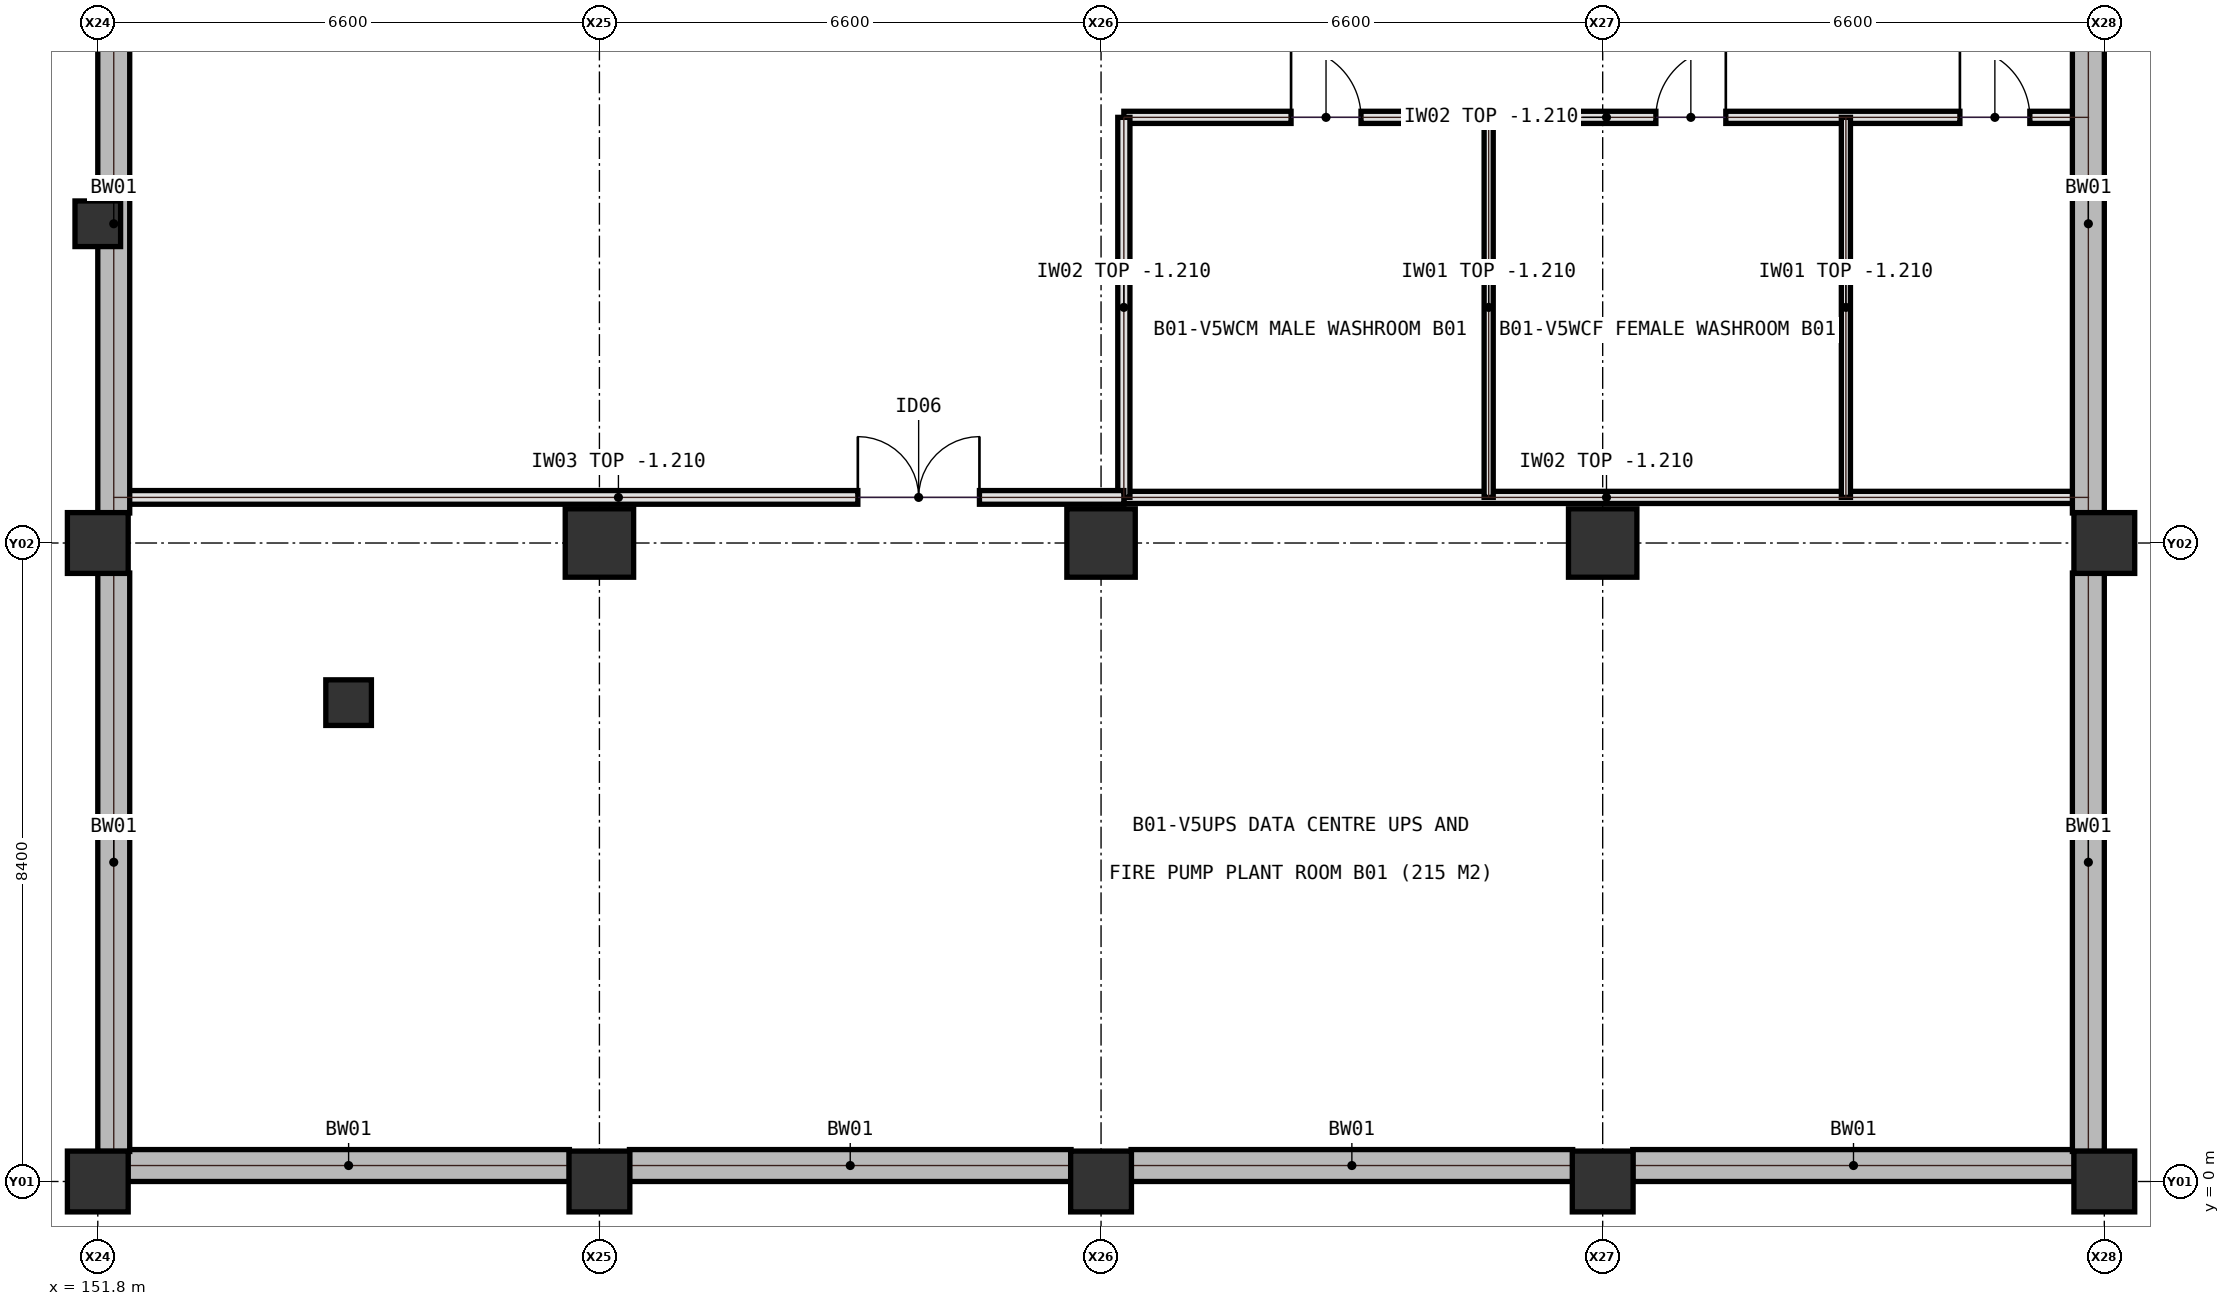
"""IFC4 building model, lengths in metres.
Left out: names, types, materials, properties, quantities, classifications, styles, units other than length and angle.
Written with IfcOpenShell. Run it as: python <this file> out.ifc"""

import sys

from ifc_helpers import new_model, si_unit, direction, frame, frame_2d, origin, origin_2d, place, context, subcontext, project, spatial, rectangle, extrude, element, fill, save


model = new_model("IFC4")
c1 = context("Model", 3, precision=1e-05, world=origin(), true_north=direction((0.0, 1.0)))
c2 = subcontext(c1, "Body", "Model", "MODEL_VIEW")
j1 = project(units=[si_unit("LENGTHUNIT", "METRE"), si_unit("PLANEANGLEUNIT", "RADIAN")], contexts=[c1])
p1 = place(None, origin())
s1 = spatial("IfcSite", under=j1, at=p1, CompositionType="ELEMENT")
p2 = place(p1, origin())
s2 = spatial("IfcBuilding", under=s1, at=p2, CompositionType="ELEMENT")
p3 = place(p2, frame((0.0, 0.0, -4.5)))
s3 = spatial("IfcBuildingStorey", under=s2, at=p3, CompositionType="ELEMENT", Elevation=-4.5)
for number, where, z_axis, x_axis in (
    (1, (151.8, 0.0, 0.0), (0.0, 0.0, 1.0), (1.0, 0.0, 0.0)),
    (2, (151.8, 8.4, 0.0), (0.0, 0.0, 1.0), (1.0, 0.0, 0.0)),
    (3, (158.4, 0.0, 0.0), (0.0, 0.0, 1.0), (1.0, 0.0, 0.0)),
):
    element("IfcColumn", number, at=place(p3, frame(where, z_axis=z_axis, x_axis=x_axis)), inside=s3, PredefinedType="COLUMN", context=c2, shape_type="SweptSolid", body=[
        extrude(rectangle(XDim=0.8, YDim=0.8, at=origin_2d()), origin(), (0.0, 0.0, 1.0), 4.5),
    ])
p4 = place(p3, frame((158.4, 8.4, 0.0), z_axis=(0.0, 0.0, 1.0), x_axis=(1.0, 0.0, 0.0)))
e4 = element("IfcColumn", 4, at=p4, inside=s3, PredefinedType="COLUMN", context=c2, shape_type="SweptSolid", body=[
    extrude(rectangle(XDim=0.9, YDim=0.9, at=origin_2d()), origin(), (0.0, 0.0, 1.0), 4.5),
])
p5 = place(p3, frame((165.0, 0.0, 0.0), z_axis=(0.0, 0.0, 1.0), x_axis=(1.0, 0.0, 0.0)))
e5 = element("IfcColumn", 5, at=p5, inside=s3, PredefinedType="COLUMN", context=c2, shape_type="SweptSolid", body=[
    extrude(rectangle(XDim=0.8, YDim=0.8, at=origin_2d()), origin(), (0.0, 0.0, 1.0), 4.5),
])
p6 = place(p3, frame((165.0, 8.4, 0.0), z_axis=(0.0, 0.0, 1.0), x_axis=(1.0, 0.0, 0.0)))
e6 = element("IfcColumn", 6, at=p6, inside=s3, PredefinedType="COLUMN", context=c2, shape_type="SweptSolid", body=[
    extrude(rectangle(XDim=0.9, YDim=0.9, at=origin_2d()), origin(), (0.0, 0.0, 1.0), 4.5),
])
p7 = place(p3, frame((171.6, 0.0, 0.0), z_axis=(0.0, 0.0, 1.0), x_axis=(1.0, 0.0, 0.0)))
e7 = element("IfcColumn", 7, at=p7, inside=s3, PredefinedType="COLUMN", context=c2, shape_type="SweptSolid", body=[
    extrude(rectangle(XDim=0.8, YDim=0.8, at=origin_2d()), origin(), (0.0, 0.0, 1.0), 4.5),
])
p8 = place(p3, frame((171.6, 8.4, 0.0), z_axis=(0.0, 0.0, 1.0), x_axis=(1.0, 0.0, 0.0)))
e8 = element("IfcColumn", 8, at=p8, inside=s3, PredefinedType="COLUMN", context=c2, shape_type="SweptSolid", body=[
    extrude(rectangle(XDim=0.9, YDim=0.9, at=origin_2d()), origin(), (0.0, 0.0, 1.0), 4.5),
])
for number, where, z_axis, x_axis in (
    (9, (178.2, 0.0, 0.0), (0.0, 0.0, 1.0), (1.0, 0.0, 0.0)),
    (10, (178.2, 8.4, 0.0), (0.0, 0.0, 1.0), (1.0, 0.0, 0.0)),
):
    element("IfcColumn", number, at=place(p3, frame(where, z_axis=z_axis, x_axis=x_axis)), inside=s3, PredefinedType="COLUMN", context=c2, shape_type="SweptSolid", body=[
        extrude(rectangle(XDim=0.8, YDim=0.8, at=origin_2d()), origin(), (0.0, 0.0, 1.0), 4.5),
    ])
for number, where, z_axis, x_axis in (
    (11, (151.8, 12.6, 0.0), (0.0, 0.0, 1.0), (1.0, 0.0, 0.0)),
    (12, (155.1, 6.3, 0.0), (0.0, 0.0, 1.0), (1.0, 0.0, 0.0)),
):
    element("IfcColumn", number, at=place(p3, frame(where, z_axis=z_axis, x_axis=x_axis)), inside=s3, PredefinedType="COLUMN", context=c2, shape_type="SweptSolid", body=[
        extrude(rectangle(XDim=0.6, YDim=0.6, at=origin_2d()), origin(), (0.0, 0.0, 1.0), 4.5),
    ])
p9 = place(p3, frame((165.3, 14.0, 0.0), z_axis=(0.0, 0.0, 1.0), x_axis=(1.0, 0.0, 0.0)))
e13 = element("IfcWall", 13, at=p9, inside=s3, PredefinedType="PARTITIONING", context=c2, shape_type="SweptSolid", body=[
    extrude(rectangle(XDim=12.7, YDim=0.16, at=frame_2d((6.35, 0.0))), origin(), (0.0, 0.0, 1.0), 3.29),
])
p10 = place(p9, frame((2.2, 0.0, 0.0)))
e14 = element("IfcOpeningElement", 14, at=p10, cuts=e13, PredefinedType="OPENING", context=c2, shape_type="SweptSolid", body=[
    extrude(rectangle(XDim=0.92, YDim=2.08, at=frame_2d((0.46, 1.04))), frame((0.0, 0.09, 0.0), z_axis=(0.0, -1.0, 0.0), x_axis=(1.0, 0.0, 0.0)), (0.0, 0.0, 1.0), 0.18),
])
p11 = place(p9, frame((7.0, 0.0, 0.0)))
e15 = element("IfcOpeningElement", 15, at=p11, cuts=e13, PredefinedType="OPENING", context=c2, shape_type="SweptSolid", body=[
    extrude(rectangle(XDim=0.92, YDim=2.08, at=frame_2d((0.46, 1.04))), frame((0.0, 0.09, 0.0), z_axis=(0.0, -1.0, 0.0), x_axis=(1.0, 0.0, 0.0)), (0.0, 0.0, 1.0), 0.18),
])
p12 = place(p9, frame((11.0, 0.0, 0.0)))
e16 = element("IfcOpeningElement", 16, at=p12, cuts=e13, PredefinedType="OPENING", context=c2, shape_type="SweptSolid", body=[
    extrude(rectangle(XDim=0.92, YDim=2.08, at=frame_2d((0.46, 1.04))), frame((0.0, 0.09, 0.0), z_axis=(0.0, -1.0, 0.0), x_axis=(1.0, 0.0, 0.0)), (0.0, 0.0, 1.0), 0.18),
])
p13 = place(p3, frame((165.3, 9.0, 0.0), z_axis=(0.0, 0.0, 1.0), x_axis=(1.0, 0.0, 0.0)))
e17 = element("IfcWall", 17, at=p13, inside=s3, PredefinedType="PARTITIONING", context=c2, shape_type="SweptSolid", body=[
    extrude(rectangle(XDim=12.7, YDim=0.16, at=frame_2d((6.35, 0.0))), origin(), (0.0, 0.0, 1.0), 3.29),
])
p14 = place(p3, frame((165.3, 9.0, 0.0), z_axis=(0.0, 0.0, 1.0), x_axis=(0.0, 1.0, 0.0)))
e18 = element("IfcWall", 18, at=p14, inside=s3, PredefinedType="PARTITIONING", context=c2, shape_type="SweptSolid", body=[
    extrude(rectangle(XDim=5.0, YDim=0.16, at=frame_2d((2.5, 0.0))), origin(), (0.0, 0.0, 1.0), 3.29),
])
for number, where, z_axis, x_axis in (
    (19, (170.1, 9.0, 0.0), (0.0, 0.0, 1.0), (0.0, 1.0, 0.0)),
    (20, (174.8, 9.0, 0.0), (0.0, 0.0, 1.0), (0.0, 1.0, 0.0)),
):
    element("IfcWall", number, at=place(p3, frame(where, z_axis=z_axis, x_axis=x_axis)), inside=s3, PredefinedType="PARTITIONING", context=c2, shape_type="SweptSolid", body=[
        extrude(rectangle(XDim=5.0, YDim=0.12, at=frame_2d((2.5, 0.0))), origin(), (0.0, 0.0, 1.0), 3.29),
    ])
p15 = place(p3, frame((152.0, 9.0, 0.0), z_axis=(0.0, 0.0, 1.0), x_axis=(1.0, 0.0, 0.0)))
e21 = element("IfcWall", 21, at=p15, inside=s3, PredefinedType="SOLIDWALL", context=c2, shape_type="SweptSolid", body=[
    extrude(rectangle(XDim=13.3, YDim=0.18, at=frame_2d((6.65, 0.0))), origin(), (0.0, 0.0, 1.0), 3.29),
])
p16 = place(p15, frame((9.8, 0.0, 0.0)))
e22 = element("IfcOpeningElement", 22, at=p16, cuts=e21, PredefinedType="OPENING", context=c2, shape_type="SweptSolid", body=[
    extrude(rectangle(XDim=1.6, YDim=2.2, at=frame_2d((0.8, 1.1))), frame((0.0, 0.1, 0.0), z_axis=(0.0, -1.0, 0.0), x_axis=(1.0, 0.0, 0.0)), (0.0, 0.0, 1.0), 0.2),
])
p17 = place(p3, frame((152.195, 0.21, 0.0), z_axis=(0.0, 0.0, 1.0), x_axis=(1.0, 0.0, 0.0)))
e23 = element("IfcWall", 23, at=p17, inside=s3, PredefinedType="SOLIDWALL", context=c2, shape_type="SweptSolid", body=[
    extrude(rectangle(XDim=5.81, YDim=0.42, at=frame_2d((2.905, 0.0))), origin(), (0.0, 0.0, 1.0), 4.14),
])
p18 = place(p3, frame((152.01, 8.005, 0.0), z_axis=(0.0, 0.0, 1.0), x_axis=(0.0, -1.0, 0.0)))
e24 = element("IfcWall", 24, at=p18, inside=s3, PredefinedType="SOLIDWALL", context=c2, shape_type="SweptSolid", body=[
    extrude(rectangle(XDim=7.61, YDim=0.42, at=frame_2d((3.805, 0.0))), origin(), (0.0, 0.0, 1.0), 4.14),
])
p19 = place(p3, frame((152.01, 16.405, 0.0), z_axis=(0.0, 0.0, 1.0), x_axis=(0.0, -1.0, 0.0)))
e25 = element("IfcWall", 25, at=p19, inside=s3, PredefinedType="SOLIDWALL", context=c2, shape_type="SweptSolid", body=[
    extrude(rectangle(XDim=7.61, YDim=0.42, at=frame_2d((3.805, 0.0))), origin(), (0.0, 0.0, 1.0), 4.14),
])
for number, where, z_axis, x_axis in (
    (26, (158.795, 0.21, 0.0), (0.0, 0.0, 1.0), (1.0, 0.0, 0.0)),
    (27, (165.395, 0.21, 0.0), (0.0, 0.0, 1.0), (1.0, 0.0, 0.0)),
):
    element("IfcWall", number, at=place(p3, frame(where, z_axis=z_axis, x_axis=x_axis)), inside=s3, PredefinedType="SOLIDWALL", context=c2, shape_type="SweptSolid", body=[
        extrude(rectangle(XDim=5.81, YDim=0.42, at=frame_2d((2.905, 0.0))), origin(), (0.0, 0.0, 1.0), 4.14),
    ])
p20 = place(p3, frame((171.995, 0.21, 0.0), z_axis=(0.0, 0.0, 1.0), x_axis=(1.0, 0.0, 0.0)))
e28 = element("IfcWall", 28, at=p20, inside=s3, PredefinedType="SOLIDWALL", context=c2, shape_type="SweptSolid", body=[
    extrude(rectangle(XDim=5.81, YDim=0.42, at=frame_2d((2.905, 0.0))), origin(), (0.0, 0.0, 1.0), 4.14),
])
p21 = place(p3, frame((177.99, 0.395, 0.0), z_axis=(0.0, 0.0, 1.0), x_axis=(0.0, 1.0, 0.0)))
e29 = element("IfcWall", 29, at=p21, inside=s3, PredefinedType="SOLIDWALL", context=c2, shape_type="SweptSolid", body=[
    extrude(rectangle(XDim=7.61, YDim=0.42, at=frame_2d((3.805, 0.0))), origin(), (0.0, 0.0, 1.0), 4.14),
])
p22 = place(p3, frame((177.99, 8.795, 0.0), z_axis=(0.0, 0.0, 1.0), x_axis=(0.0, 1.0, 0.0)))
e30 = element("IfcWall", 30, at=p22, inside=s3, PredefinedType="SOLIDWALL", context=c2, shape_type="SweptSolid", body=[
    extrude(rectangle(XDim=7.61, YDim=0.42, at=frame_2d((3.805, 0.0))), origin(), (0.0, 0.0, 1.0), 4.14),
])
p23 = place(p10, origin())
e31 = element("IfcDoor", 31, at=p23, inside=s3, OperationType="SINGLE_SWING_LEFT", PredefinedType="DOOR", context=c2, shape_type="SweptSolid", body=[
    extrude(rectangle(XDim=0.92, YDim=2.08, at=frame_2d((0.46, 1.04))), frame((0.0, 0.025, 0.0), z_axis=(0.0, -1.0, 0.0), x_axis=(1.0, 0.0, 0.0)), (0.0, 0.0, 1.0), 0.05),
])
fill(e14, e31)
p24 = place(p11, origin())
e32 = element("IfcDoor", 32, at=p24, inside=s3, OperationType="SINGLE_SWING_RIGHT", PredefinedType="DOOR", context=c2, shape_type="SweptSolid", body=[
    extrude(rectangle(XDim=0.92, YDim=2.08, at=frame_2d((0.46, 1.04))), frame((0.0, 0.025, 0.0), z_axis=(0.0, -1.0, 0.0), x_axis=(1.0, 0.0, 0.0)), (0.0, 0.0, 1.0), 0.05),
])
fill(e15, e32)
p25 = place(p12, origin())
e33 = element("IfcDoor", 33, at=p25, inside=s3, OperationType="SINGLE_SWING_LEFT", PredefinedType="DOOR", context=c2, shape_type="SweptSolid", body=[
    extrude(rectangle(XDim=0.92, YDim=2.08, at=frame_2d((0.46, 1.04))), frame((0.0, 0.025, 0.0), z_axis=(0.0, -1.0, 0.0), x_axis=(1.0, 0.0, 0.0)), (0.0, 0.0, 1.0), 0.05),
])
fill(e16, e33)
p26 = place(p16, origin())
e34 = element("IfcDoor", 34, at=p26, inside=s3, OperationType="DOUBLE_DOOR_SINGLE_SWING", PredefinedType="DOOR", context=c2, shape_type="SweptSolid", body=[
    extrude(rectangle(XDim=1.6, YDim=2.2, at=frame_2d((0.8, 1.1))), frame((0.0, 0.025, 0.0), z_axis=(0.0, -1.0, 0.0), x_axis=(1.0, 0.0, 0.0)), (0.0, 0.0, 1.0), 0.05),
])
fill(e22, e34)
save(model, sys.argv[1])
